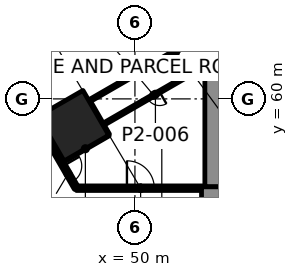
"""IFC4 building model, lengths in metres.
Left out: names, types, materials, properties, quantities, classifications, styles, units other than length and angle.
Written with IfcOpenShell. Run it as: python <this file> out.ifc"""

import sys

from ifc_helpers import new_model, si_unit, direction, frame, frame_2d, origin, origin_2d, place, context, subcontext, project, spatial, rectangle, extrude, element, fill, save


model = new_model("IFC4")
c1 = context("Model", 3, precision=1e-05, world=origin(), true_north=direction((0.0, 1.0)))
c2 = subcontext(c1, "Body", "Model", "MODEL_VIEW")
j1 = project(units=[si_unit("LENGTHUNIT", "METRE"), si_unit("PLANEANGLEUNIT", "RADIAN")], contexts=[c1])
p1 = place(None, origin())
s1 = spatial("IfcSite", under=j1, at=p1, CompositionType="ELEMENT")
p2 = place(p1, origin())
s2 = spatial("IfcBuilding", under=s1, at=p2, CompositionType="ELEMENT")
p3 = place(p2, origin())
s3 = spatial("IfcBuildingStorey", under=s2, at=p3, CompositionType="ELEMENT", Elevation=0.0)
p4 = place(p3, frame((55.8, 54.215, -0.3), z_axis=(0.0, 0.0, 1.0), x_axis=(0.0, 1.0, 0.0)))
e1 = element("IfcWall", 1, at=p4, inside=s3, PredefinedType="SHEAR", context=c2, shape_type="SweptSolid", body=[
    extrude(rectangle(XDim=8.0, YDim=2.4, at=frame_2d((4.0, 0.0))), origin(), (0.0, 0.0, 1.0), 8.3),
])
p5 = place(p3, frame((45.959, 58.233, 0.0), z_axis=(0.0, 0.0, 1.0), x_axis=(0.5, -0.866025403784, 0.0)))
e2 = element("IfcColumn", 2, at=p5, inside=s3, PredefinedType="COLUMN", context=c2, shape_type="SweptSolid", body=[
    extrude(rectangle(XDim=3.4, YDim=3.4, at=origin_2d()), origin(), (0.0, 0.0, 1.0), 8.0),
])
p6 = place(p3, frame((45.198, 55.831, 0.0), z_axis=(0.0, 0.0, 1.0), x_axis=(0.866014251095, 0.500019316528, 0.0)))
e3 = element("IfcWall", 3, at=p6, inside=s3, PredefinedType="PARTITIONING", context=c2, shape_type="SweptSolid", body=[
    extrude(rectangle(XDim=3.559, YDim=0.1, at=frame_2d((1.78, 0.0))), origin(), (0.0, 0.0, 1.0), 7.1),
])
p7 = place(p3, frame((54.814, 62.306, 0.0), z_axis=(0.0, 0.0, 1.0), x_axis=(-0.866017985154, -0.500012849225, 0.0)))
e4 = element("IfcWall", 4, at=p7, inside=s3, PredefinedType="PARTITIONING", context=c2, shape_type="SweptSolid", body=[
    extrude(rectangle(XDim=8.005, YDim=0.15, at=frame_2d((4.002, 0.0))), origin(), (0.0, 0.0, 1.0), 6.947),
])
p8 = place(p7, frame((3.688, 0.0, 0.0)))
e5 = element("IfcOpeningElement", 5, at=p8, cuts=e4, PredefinedType="OPENING", context=c2, shape_type="SweptSolid", body=[
    extrude(rectangle(XDim=0.9, YDim=2.1, at=frame_2d((0.45, 1.05))), frame((0.0, 0.085, 0.0), z_axis=(0.0, -1.0, 0.0), x_axis=(1.0, 0.0, 0.0)), (0.0, 0.0, 1.0), 0.17),
])
p9 = place(p3, frame((46.981, 59.863, 0.0), z_axis=(0.0, 0.0, 1.0), x_axis=(0.866026517173, 0.499998071549, 0.0)))
e6 = element("IfcWall", 6, at=p9, inside=s3, PredefinedType="PARTITIONING", context=c2, shape_type="SweptSolid", body=[
    extrude(rectangle(XDim=13.214, YDim=0.15, at=frame_2d((6.607, 0.0))), origin(), (0.0, 0.0, 1.0), 7.1),
])
p10 = place(p9, frame((6.157, 0.0, 0.0)))
e7 = element("IfcOpeningElement", 7, at=p10, cuts=e6, PredefinedType="OPENING", context=c2, shape_type="SweptSolid", body=[
    extrude(rectangle(XDim=0.9, YDim=2.1, at=frame_2d((0.45, 1.05))), frame((0.0, 0.085, 0.0), z_axis=(0.0, -1.0, 0.0), x_axis=(1.0, 0.0, 0.0)), (0.0, 0.0, 1.0), 0.17),
])
p11 = place(p3, frame((48.256, 57.655, 0.0), z_axis=(0.0, 0.0, 1.0), x_axis=(-0.500108776725, 0.865962592404, 0.0)))
e8 = element("IfcWall", 8, at=p11, inside=s3, PredefinedType="PARTITIONING", context=c2, shape_type="SweptSolid", body=[
    extrude(rectangle(XDim=0.675, YDim=0.15, at=frame_2d((0.337, 0.0))), origin(), (0.0, 0.0, 1.0), 7.1),
])
p12 = place(p3, frame((47.844, 58.369, 0.0), z_axis=(0.0, 0.0, 1.0), x_axis=(-0.499991515992, 0.866030301974, 0.0)))
e9 = element("IfcWall", 9, at=p12, inside=s3, PredefinedType="PARTITIONING", context=c2, shape_type="SweptSolid", body=[
    extrude(rectangle(XDim=1.649, YDim=0.15, at=frame_2d((0.825, 0.0))), origin(), (0.0, 0.0, 1.0), 6.947),
])
p13 = place(p3, frame((46.148, 54.125, 0.0), z_axis=(0.0, 0.0, 1.0), x_axis=(1.0, 0.0, 0.0)))
e10 = element("IfcWall", 10, at=p13, inside=s3, PredefinedType="SOLIDWALL", context=c2, shape_type="SweptSolid", body=[
    extrude(rectangle(XDim=8.452, YDim=0.3, at=frame_2d((4.226, 0.0))), origin(), (0.0, 0.0, 1.0), 7.7),
])
p14 = place(p13, frame((3.326, 0.0, 0.0)))
e11 = element("IfcOpeningElement", 11, at=p14, cuts=e10, PredefinedType="OPENING", context=c2, shape_type="SweptSolid", body=[
    extrude(rectangle(XDim=1.8, YDim=2.4, at=frame_2d((0.9, 1.2))), frame((0.0, 0.16, 0.0), z_axis=(0.0, -1.0, 0.0), x_axis=(1.0, 0.0, 0.0)), (0.0, 0.0, 1.0), 0.32),
])
p15 = place(p13, frame((0.676, 0.0, 0.15)))
e12 = element("IfcOpeningElement", 12, at=p15, cuts=e10, PredefinedType="OPENING", context=c2, shape_type="SweptSolid", body=[
    extrude(rectangle(XDim=2.1, YDim=5.4, at=frame_2d((1.05, 2.7))), frame((0.0, 0.16, 0.0), z_axis=(0.0, -1.0, 0.0), x_axis=(1.0, 0.0, 0.0)), (0.0, 0.0, 1.0), 0.32),
])
p16 = place(p13, frame((5.676, 0.0, 0.15)))
e13 = element("IfcOpeningElement", 13, at=p16, cuts=e10, PredefinedType="OPENING", context=c2, shape_type="SweptSolid", body=[
    extrude(rectangle(XDim=2.1, YDim=5.4, at=frame_2d((1.05, 2.7))), frame((0.0, 0.16, 0.0), z_axis=(0.0, -1.0, 0.0), x_axis=(1.0, 0.0, 0.0)), (0.0, 0.0, 1.0), 0.32),
])
p17 = place(p3, frame((71.348, 110.424, 0.0), z_axis=(0.0, 0.0, 1.0), x_axis=(-0.500000550228, -0.86602508611, 0.0)))
e14 = element("IfcWall", 14, at=p17, inside=s3, PredefinedType="SOLIDWALL", context=c2, shape_type="SweptSolid", body=[
    extrude(rectangle(XDim=57.704, YDim=0.3, at=frame_2d((28.852, 0.0))), origin(), (0.0, 0.0, 1.0), 7.7),
])
p18 = place(p17, frame((16.711, 0.0, 0.0)))
e15 = element("IfcOpeningElement", 15, at=p18, cuts=e14, PredefinedType="OPENING", context=c2, shape_type="SweptSolid", body=[
    extrude(rectangle(XDim=1.2, YDim=2.4, at=frame_2d((0.6, 1.2))), frame((0.0, 0.16, 0.0), z_axis=(0.0, -1.0, 0.0), x_axis=(1.0, 0.0, 0.0)), (0.0, 0.0, 1.0), 0.32),
])
p19 = place(p17, frame((1.552, 0.0, 0.15)))
e16 = element("IfcOpeningElement", 16, at=p19, cuts=e14, PredefinedType="OPENING", context=c2, shape_type="SweptSolid", body=[
    extrude(rectangle(XDim=2.1, YDim=5.4, at=frame_2d((1.05, 2.7))), frame((0.0, 0.16, 0.0), z_axis=(0.0, -1.0, 0.0), x_axis=(1.0, 0.0, 0.0)), (0.0, 0.0, 1.0), 0.32),
])
p20 = place(p17, frame((4.052, 0.0, 0.15)))
e17 = element("IfcOpeningElement", 17, at=p20, cuts=e14, PredefinedType="OPENING", context=c2, shape_type="SweptSolid", body=[
    extrude(rectangle(XDim=2.1, YDim=5.4, at=frame_2d((1.05, 2.7))), frame((0.0, 0.16, 0.0), z_axis=(0.0, -1.0, 0.0), x_axis=(1.0, 0.0, 0.0)), (0.0, 0.0, 1.0), 0.32),
])
p21 = place(p17, frame((6.552, 0.0, 0.15)))
e18 = element("IfcOpeningElement", 18, at=p21, cuts=e14, PredefinedType="OPENING", context=c2, shape_type="SweptSolid", body=[
    extrude(rectangle(XDim=2.1, YDim=5.4, at=frame_2d((1.05, 2.7))), frame((0.0, 0.16, 0.0), z_axis=(0.0, -1.0, 0.0), x_axis=(1.0, 0.0, 0.0)), (0.0, 0.0, 1.0), 0.32),
])
p22 = place(p17, frame((9.052, 0.0, 0.15)))
e19 = element("IfcOpeningElement", 19, at=p22, cuts=e14, PredefinedType="OPENING", context=c2, shape_type="SweptSolid", body=[
    extrude(rectangle(XDim=2.1, YDim=5.4, at=frame_2d((1.05, 2.7))), frame((0.0, 0.16, 0.0), z_axis=(0.0, -1.0, 0.0), x_axis=(1.0, 0.0, 0.0)), (0.0, 0.0, 1.0), 0.32),
])
p23 = place(p17, frame((11.552, 0.0, 0.15)))
e20 = element("IfcOpeningElement", 20, at=p23, cuts=e14, PredefinedType="OPENING", context=c2, shape_type="SweptSolid", body=[
    extrude(rectangle(XDim=2.1, YDim=5.4, at=frame_2d((1.05, 2.7))), frame((0.0, 0.16, 0.0), z_axis=(0.0, -1.0, 0.0), x_axis=(1.0, 0.0, 0.0)), (0.0, 0.0, 1.0), 0.32),
])
p24 = place(p17, frame((14.052, 0.0, 0.15)))
e21 = element("IfcOpeningElement", 21, at=p24, cuts=e14, PredefinedType="OPENING", context=c2, shape_type="SweptSolid", body=[
    extrude(rectangle(XDim=2.1, YDim=5.4, at=frame_2d((1.05, 2.7))), frame((0.0, 0.16, 0.0), z_axis=(0.0, -1.0, 0.0), x_axis=(1.0, 0.0, 0.0)), (0.0, 0.0, 1.0), 0.32),
])
p25 = place(p17, frame((19.052, 0.0, 0.15)))
e22 = element("IfcOpeningElement", 22, at=p25, cuts=e14, PredefinedType="OPENING", context=c2, shape_type="SweptSolid", body=[
    extrude(rectangle(XDim=2.1, YDim=5.4, at=frame_2d((1.05, 2.7))), frame((0.0, 0.16, 0.0), z_axis=(0.0, -1.0, 0.0), x_axis=(1.0, 0.0, 0.0)), (0.0, 0.0, 1.0), 0.32),
])
p26 = place(p17, frame((21.552, 0.0, 0.15)))
e23 = element("IfcOpeningElement", 23, at=p26, cuts=e14, PredefinedType="OPENING", context=c2, shape_type="SweptSolid", body=[
    extrude(rectangle(XDim=2.1, YDim=5.4, at=frame_2d((1.05, 2.7))), frame((0.0, 0.16, 0.0), z_axis=(0.0, -1.0, 0.0), x_axis=(1.0, 0.0, 0.0)), (0.0, 0.0, 1.0), 0.32),
])
p27 = place(p17, frame((24.052, 0.0, 0.15)))
e24 = element("IfcOpeningElement", 24, at=p27, cuts=e14, PredefinedType="OPENING", context=c2, shape_type="SweptSolid", body=[
    extrude(rectangle(XDim=2.1, YDim=5.4, at=frame_2d((1.05, 2.7))), frame((0.0, 0.16, 0.0), z_axis=(0.0, -1.0, 0.0), x_axis=(1.0, 0.0, 0.0)), (0.0, 0.0, 1.0), 0.32),
])
p28 = place(p17, frame((26.552, 0.0, 0.15)))
e25 = element("IfcOpeningElement", 25, at=p28, cuts=e14, PredefinedType="OPENING", context=c2, shape_type="SweptSolid", body=[
    extrude(rectangle(XDim=2.1, YDim=5.4, at=frame_2d((1.05, 2.7))), frame((0.0, 0.16, 0.0), z_axis=(0.0, -1.0, 0.0), x_axis=(1.0, 0.0, 0.0)), (0.0, 0.0, 1.0), 0.32),
])
p29 = place(p17, frame((29.052, 0.0, 0.15)))
e26 = element("IfcOpeningElement", 26, at=p29, cuts=e14, PredefinedType="OPENING", context=c2, shape_type="SweptSolid", body=[
    extrude(rectangle(XDim=2.1, YDim=5.4, at=frame_2d((1.05, 2.7))), frame((0.0, 0.16, 0.0), z_axis=(0.0, -1.0, 0.0), x_axis=(1.0, 0.0, 0.0)), (0.0, 0.0, 1.0), 0.32),
])
p30 = place(p17, frame((31.552, 0.0, 0.15)))
e27 = element("IfcOpeningElement", 27, at=p30, cuts=e14, PredefinedType="OPENING", context=c2, shape_type="SweptSolid", body=[
    extrude(rectangle(XDim=2.1, YDim=5.4, at=frame_2d((1.05, 2.7))), frame((0.0, 0.16, 0.0), z_axis=(0.0, -1.0, 0.0), x_axis=(1.0, 0.0, 0.0)), (0.0, 0.0, 1.0), 0.32),
])
p31 = place(p17, frame((34.052, 0.0, 0.15)))
e28 = element("IfcOpeningElement", 28, at=p31, cuts=e14, PredefinedType="OPENING", context=c2, shape_type="SweptSolid", body=[
    extrude(rectangle(XDim=2.1, YDim=5.4, at=frame_2d((1.05, 2.7))), frame((0.0, 0.16, 0.0), z_axis=(0.0, -1.0, 0.0), x_axis=(1.0, 0.0, 0.0)), (0.0, 0.0, 1.0), 0.32),
])
p32 = place(p17, frame((36.552, 0.0, 0.15)))
e29 = element("IfcOpeningElement", 29, at=p32, cuts=e14, PredefinedType="OPENING", context=c2, shape_type="SweptSolid", body=[
    extrude(rectangle(XDim=2.1, YDim=5.4, at=frame_2d((1.05, 2.7))), frame((0.0, 0.16, 0.0), z_axis=(0.0, -1.0, 0.0), x_axis=(1.0, 0.0, 0.0)), (0.0, 0.0, 1.0), 0.32),
])
p33 = place(p17, frame((39.052, 0.0, 0.15)))
e30 = element("IfcOpeningElement", 30, at=p33, cuts=e14, PredefinedType="OPENING", context=c2, shape_type="SweptSolid", body=[
    extrude(rectangle(XDim=2.1, YDim=5.4, at=frame_2d((1.05, 2.7))), frame((0.0, 0.16, 0.0), z_axis=(0.0, -1.0, 0.0), x_axis=(1.0, 0.0, 0.0)), (0.0, 0.0, 1.0), 0.32),
])
p34 = place(p17, frame((41.552, 0.0, 0.15)))
e31 = element("IfcOpeningElement", 31, at=p34, cuts=e14, PredefinedType="OPENING", context=c2, shape_type="SweptSolid", body=[
    extrude(rectangle(XDim=2.1, YDim=5.4, at=frame_2d((1.05, 2.7))), frame((0.0, 0.16, 0.0), z_axis=(0.0, -1.0, 0.0), x_axis=(1.0, 0.0, 0.0)), (0.0, 0.0, 1.0), 0.32),
])
p35 = place(p17, frame((44.052, 0.0, 0.15)))
e32 = element("IfcOpeningElement", 32, at=p35, cuts=e14, PredefinedType="OPENING", context=c2, shape_type="SweptSolid", body=[
    extrude(rectangle(XDim=2.1, YDim=5.4, at=frame_2d((1.05, 2.7))), frame((0.0, 0.16, 0.0), z_axis=(0.0, -1.0, 0.0), x_axis=(1.0, 0.0, 0.0)), (0.0, 0.0, 1.0), 0.32),
])
p36 = place(p17, frame((46.552, 0.0, 0.15)))
e33 = element("IfcOpeningElement", 33, at=p36, cuts=e14, PredefinedType="OPENING", context=c2, shape_type="SweptSolid", body=[
    extrude(rectangle(XDim=2.1, YDim=5.4, at=frame_2d((1.05, 2.7))), frame((0.0, 0.16, 0.0), z_axis=(0.0, -1.0, 0.0), x_axis=(1.0, 0.0, 0.0)), (0.0, 0.0, 1.0), 0.32),
])
p37 = place(p17, frame((49.052, 0.0, 0.15)))
e34 = element("IfcOpeningElement", 34, at=p37, cuts=e14, PredefinedType="OPENING", context=c2, shape_type="SweptSolid", body=[
    extrude(rectangle(XDim=2.1, YDim=5.4, at=frame_2d((1.05, 2.7))), frame((0.0, 0.16, 0.0), z_axis=(0.0, -1.0, 0.0), x_axis=(1.0, 0.0, 0.0)), (0.0, 0.0, 1.0), 0.32),
])
p38 = place(p17, frame((51.552, 0.0, 0.15)))
e35 = element("IfcOpeningElement", 35, at=p38, cuts=e14, PredefinedType="OPENING", context=c2, shape_type="SweptSolid", body=[
    extrude(rectangle(XDim=2.1, YDim=5.4, at=frame_2d((1.05, 2.7))), frame((0.0, 0.16, 0.0), z_axis=(0.0, -1.0, 0.0), x_axis=(1.0, 0.0, 0.0)), (0.0, 0.0, 1.0), 0.32),
])
p39 = place(p17, frame((54.052, 0.0, 0.15)))
e36 = element("IfcOpeningElement", 36, at=p39, cuts=e14, PredefinedType="OPENING", context=c2, shape_type="SweptSolid", body=[
    extrude(rectangle(XDim=2.1, YDim=5.4, at=frame_2d((1.05, 2.7))), frame((0.0, 0.16, 0.0), z_axis=(0.0, -1.0, 0.0), x_axis=(1.0, 0.0, 0.0)), (0.0, 0.0, 1.0), 0.32),
])
p40 = place(p3, frame((42.496, 60.451, 0.0), z_axis=(0.0, 0.0, 1.0), x_axis=(0.500000231294, -0.866025270247, 0.0)))
e37 = element("IfcWall", 37, at=p40, inside=s3, PredefinedType="SOLIDWALL", context=c2, shape_type="SweptSolid", body=[
    extrude(rectangle(XDim=7.304, YDim=0.3, at=frame_2d((3.652, 0.0))), origin(), (0.0, 0.0, 1.0), 7.7),
])
p41 = place(p40, frame((5.608, 0.0, 0.0)))
e38 = element("IfcOpeningElement", 38, at=p41, cuts=e37, PredefinedType="OPENING", context=c2, shape_type="SweptSolid", body=[
    extrude(rectangle(XDim=1.2, YDim=2.4, at=frame_2d((0.6, 1.2))), frame((0.0, 0.16, 0.0), z_axis=(0.0, -1.0, 0.0), x_axis=(1.0, 0.0, 0.0)), (0.0, 0.0, 1.0), 0.32),
])
p42 = place(p40, frame((1.352, 0.0, 0.15)))
e39 = element("IfcOpeningElement", 39, at=p42, cuts=e37, PredefinedType="OPENING", context=c2, shape_type="SweptSolid", body=[
    extrude(rectangle(XDim=2.1, YDim=5.4, at=frame_2d((1.05, 2.7))), frame((0.0, 0.16, 0.0), z_axis=(0.0, -1.0, 0.0), x_axis=(1.0, 0.0, 0.0)), (0.0, 0.0, 1.0), 0.32),
])
p43 = place(p3, frame((54.38, 53.715, -0.15), z_axis=(0.0, 0.0, 1.0), x_axis=(1.0, 0.0, 0.0)))
e40 = element("IfcWall", 40, at=p43, inside=s3, PredefinedType="SOLIDWALL", context=c2, shape_type="SweptSolid", body=[
    extrude(rectangle(XDim=2.62, YDim=1.0, at=frame_2d((1.31, 0.0))), origin(), (0.0, 0.0, 1.0), 28.95),
])
p44 = place(p8, origin())
e41 = element("IfcDoor", 41, at=p44, inside=s3, OperationType="SINGLE_SWING_RIGHT", PredefinedType="DOOR", context=c2, shape_type="SweptSolid", body=[
    extrude(rectangle(XDim=0.9, YDim=2.1, at=frame_2d((0.45, 1.05))), frame((0.0, 0.025, 0.0), z_axis=(0.0, -1.0, 0.0), x_axis=(1.0, 0.0, 0.0)), (0.0, 0.0, 1.0), 0.05),
])
fill(e5, e41)
p45 = place(p10, origin())
e42 = element("IfcDoor", 42, at=p45, inside=s3, OperationType="SINGLE_SWING_RIGHT", PredefinedType="DOOR", context=c2, shape_type="SweptSolid", body=[
    extrude(rectangle(XDim=0.9, YDim=2.1, at=frame_2d((0.45, 1.05))), frame((0.0, 0.025, 0.0), z_axis=(0.0, -1.0, 0.0), x_axis=(1.0, 0.0, 0.0)), (0.0, 0.0, 1.0), 0.05),
])
fill(e7, e42)
p46 = place(p14, origin())
e43 = element("IfcDoor", 43, at=p46, inside=s3, OperationType="DOUBLE_DOOR_SINGLE_SWING", PredefinedType="DOOR", context=c2, shape_type="SweptSolid", body=[
    extrude(rectangle(XDim=1.8, YDim=2.4, at=frame_2d((0.9, 1.2))), frame((0.0, 0.025, 0.0), z_axis=(0.0, -1.0, 0.0), x_axis=(1.0, 0.0, 0.0)), (0.0, 0.0, 1.0), 0.05),
])
fill(e11, e43)
p47 = place(p15, origin())
e44 = element("IfcWindow", 44, at=p47, inside=s3, PartitioningType="SINGLE_PANEL", PredefinedType="WINDOW", context=c2, shape_type="SweptSolid", body=[
    extrude(rectangle(XDim=2.1, YDim=5.4, at=frame_2d((1.05, 2.7))), frame((0.0, 0.03, 0.0), z_axis=(0.0, -1.0, 0.0), x_axis=(1.0, 0.0, 0.0)), (0.0, 0.0, 1.0), 0.06),
])
fill(e12, e44)
p48 = place(p16, origin())
e45 = element("IfcWindow", 45, at=p48, inside=s3, PartitioningType="SINGLE_PANEL", PredefinedType="WINDOW", context=c2, shape_type="SweptSolid", body=[
    extrude(rectangle(XDim=2.1, YDim=5.4, at=frame_2d((1.05, 2.7))), frame((0.0, 0.03, 0.0), z_axis=(0.0, -1.0, 0.0), x_axis=(1.0, 0.0, 0.0)), (0.0, 0.0, 1.0), 0.06),
])
fill(e13, e45)
p49 = place(p41, origin())
e46 = element("IfcDoor", 46, at=p49, inside=s3, OperationType="SINGLE_SWING_RIGHT", PredefinedType="DOOR", context=c2, shape_type="SweptSolid", body=[
    extrude(rectangle(XDim=1.2, YDim=2.4, at=frame_2d((0.6, 1.2))), frame((0.0, 0.025, 0.0), z_axis=(0.0, -1.0, 0.0), x_axis=(1.0, 0.0, 0.0)), (0.0, 0.0, 1.0), 0.05),
])
fill(e38, e46)
save(model, sys.argv[1])
